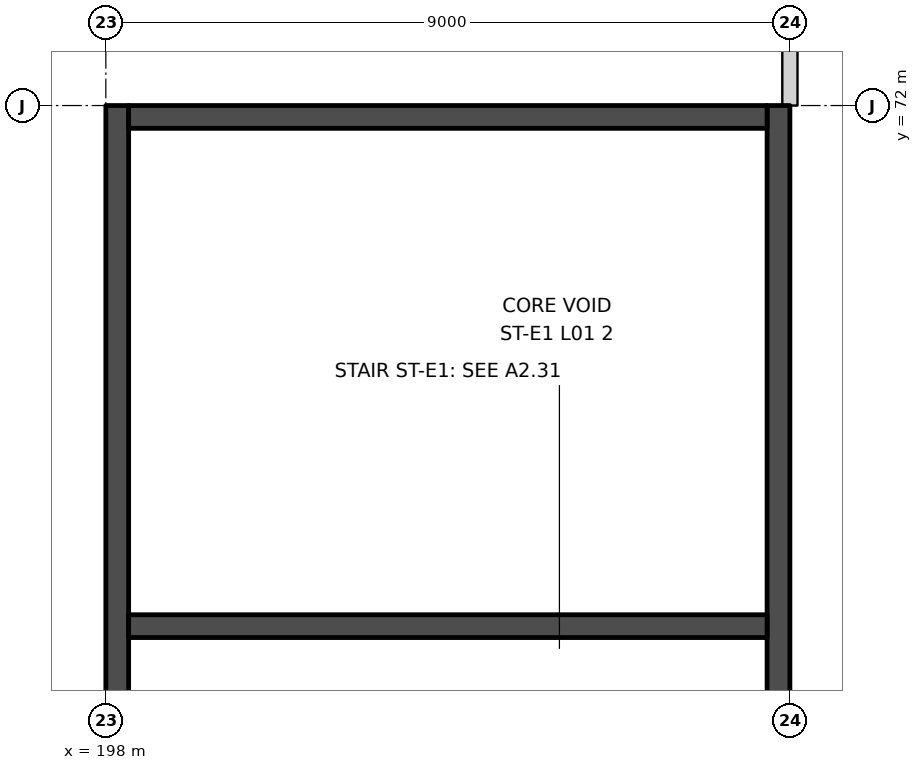
"""IFC4 building model, lengths in metres.
Left out: names, types, materials, properties, quantities, classifications, styles, units other than length and angle.
Written with IfcOpenShell. Run it as: python <this file> out.ifc"""

import sys

from ifc_helpers import new_model, si_unit, direction, frame, frame_2d, origin, place, context, subcontext, project, spatial, rectangle, extrude, element, save


model = new_model("IFC4")
c1 = context("Model", 3, precision=1e-05, world=origin(), true_north=direction((0.0, 1.0)))
c2 = subcontext(c1, "Body", "Model", "MODEL_VIEW")
j1 = project(units=[si_unit("LENGTHUNIT", "METRE"), si_unit("PLANEANGLEUNIT", "RADIAN")], contexts=[c1])
p1 = place(None, origin())
s1 = spatial("IfcSite", under=j1, at=p1, CompositionType="ELEMENT")
p2 = place(p1, origin())
s2 = spatial("IfcBuilding", under=s1, at=p2, CompositionType="ELEMENT")
p3 = place(p2, frame((0.0, 0.0, 7.0)))
s3 = spatial("IfcBuildingStorey", under=s2, at=p3, CompositionType="ELEMENT", Elevation=7.0)
p4 = place(p3, frame((207.0, 72.0, 0.0), z_axis=(0.0, 0.0, 1.0), x_axis=(0.0, 1.0, 0.0)))
e1 = element("IfcWall", 1, at=p4, inside=s3, PredefinedType="PARTITIONING", context=c2, shape_type="SweptSolid", body=[
    extrude(rectangle(XDim=8.55, YDim=0.2, at=frame_2d((4.275, 0.0))), origin(), (0.0, 0.0, 1.0), 3.15),
])
p5 = place(p4, frame((3.075, 0.0, 0.0)))
e2 = element("IfcOpeningElement", 2, at=p5, cuts=e1, PredefinedType="OPENING", context=c2, shape_type="SweptSolid", body=[
    extrude(rectangle(XDim=2.4, YDim=2.4, at=frame_2d((1.2, 1.2))), frame((0.0, 0.11, 0.0), z_axis=(0.0, -1.0, 0.0), x_axis=(1.0, 0.0, 0.0)), (0.0, 0.0, 1.0), 0.22),
])
p6 = place(p3, frame((198.15, 54.0, 0.0), z_axis=(0.0, 0.0, 1.0), x_axis=(0.0, 1.0, 0.0)))
e3 = element("IfcWall", 3, at=p6, inside=s3, PredefinedType="SHEAR", context=c2, shape_type="SweptSolid", body=[
    extrude(rectangle(XDim=18.0, YDim=0.3, at=frame_2d((9.0, 0.0))), origin(), (0.0, 0.0, 1.0), 4.5),
])
p7 = place(p6, frame((1.5, 0.0, 0.0)))
e4 = element("IfcOpeningElement", 4, at=p7, cuts=e3, PredefinedType="OPENING", context=c2, shape_type="SweptSolid", body=[
    extrude(rectangle(XDim=1.2, YDim=2.1, at=frame_2d((0.6, 1.05))), frame((0.0, 0.16, 0.0), z_axis=(0.0, -1.0, 0.0), x_axis=(1.0, 0.0, 0.0)), (0.0, 0.0, 1.0), 0.32),
])
p8 = place(p3, frame((206.85, 54.0, 0.0), z_axis=(0.0, 0.0, 1.0), x_axis=(0.0, 1.0, 0.0)))
e5 = element("IfcWall", 5, at=p8, inside=s3, PredefinedType="SHEAR", context=c2, shape_type="SweptSolid", body=[
    extrude(rectangle(XDim=18.0, YDim=0.3, at=frame_2d((9.0, 0.0))), origin(), (0.0, 0.0, 1.0), 4.5),
])
for number, where, z_axis, x_axis in (
    (6, (198.3, 71.85, 0.0), (0.0, 0.0, 1.0), (1.0, 0.0, 0.0)),
    (7, (198.3, 65.15, 0.0), (0.0, 0.0, 1.0), (1.0, 0.0, 0.0)),
):
    element("IfcWall", number, at=place(p3, frame(where, z_axis=z_axis, x_axis=x_axis)), inside=s3, PredefinedType="SHEAR", context=c2, shape_type="SweptSolid", body=[
        extrude(rectangle(XDim=8.4, YDim=0.3, at=frame_2d((4.2, 0.0))), origin(), (0.0, 0.0, 1.0), 4.5),
    ])
save(model, sys.argv[1])
